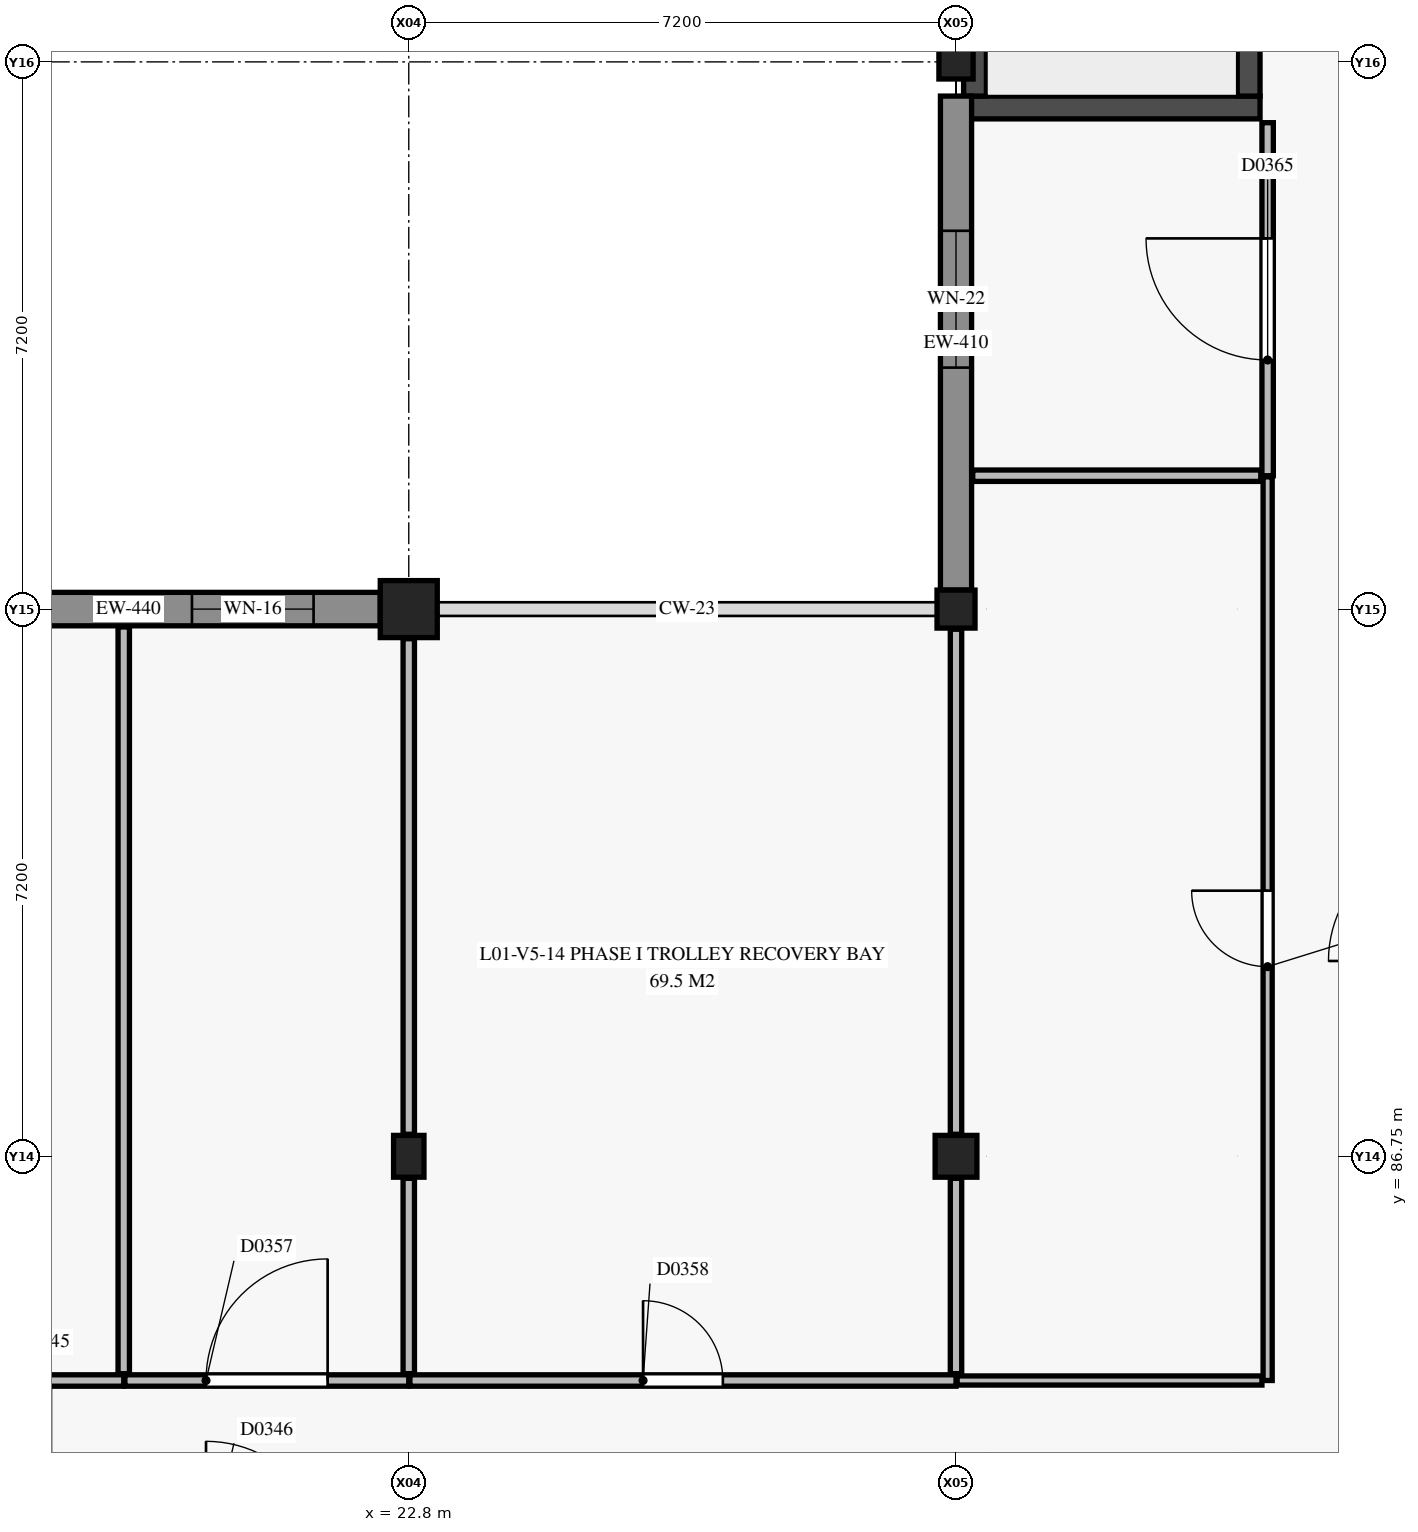
"""IFC4 building model, lengths in metres.
Left out: names, types, materials, properties, quantities, classifications, styles, units other than length and angle.
Written with IfcOpenShell. Run it as: python <this file> out.ifc"""

import sys

from ifc_helpers import new_model, si_unit, direction, frame, frame_2d, origin, origin_2d, place, context, subcontext, project, spatial, rectangle, extrude, element, fill, save


model = new_model("IFC4")
c1 = context("Model", 3, precision=1e-05, world=origin(), true_north=direction((0.0, 1.0)))
c2 = subcontext(c1, "Body", "Model", "MODEL_VIEW")
j1 = project(units=[si_unit("LENGTHUNIT", "METRE"), si_unit("PLANEANGLEUNIT", "RADIAN")], contexts=[c1])
p1 = place(None, origin())
s1 = spatial("IfcSite", under=j1, at=p1, CompositionType="ELEMENT")
p2 = place(p1, origin())
s2 = spatial("IfcBuilding", under=s1, at=p2, CompositionType="ELEMENT")
p3 = place(p2, frame((0.0, 0.0, 4.8)))
s3 = spatial("IfcBuildingStorey", under=s2, at=p3, CompositionType="ELEMENT", Elevation=4.8)
p4 = place(p3, frame((22.8, 86.75, 0.0), z_axis=(0.0, 0.0, 1.0), x_axis=(1.0, 0.0, 0.0)))
e1 = element("IfcColumn", 1, at=p4, inside=s3, PredefinedType="COLUMN", context=c2, shape_type="SweptSolid", body=[
    extrude(rectangle(XDim=0.4, YDim=0.55, at=origin_2d()), origin(), (0.0, 0.0, 1.0), 4.2),
])
p5 = place(p3, frame((22.8, 93.95, 0.0), z_axis=(0.0, 0.0, 1.0), x_axis=(1.0, 0.0, 0.0)))
e2 = element("IfcColumn", 2, at=p5, inside=s3, PredefinedType="COLUMN", context=c2, shape_type="SweptSolid", body=[
    extrude(rectangle(XDim=0.75, YDim=0.75, at=origin_2d()), origin(), (0.0, 0.0, 1.0), 4.2),
])
p6 = place(p3, frame((30.0, 86.75, 0.0), z_axis=(0.0, 0.0, 1.0), x_axis=(1.0, 0.0, 0.0)))
e3 = element("IfcColumn", 3, at=p6, inside=s3, PredefinedType="COLUMN", context=c2, shape_type="SweptSolid", body=[
    extrude(rectangle(XDim=0.55, YDim=0.55, at=origin_2d()), origin(), (0.0, 0.0, 1.0), 4.2),
])
p7 = place(p3, frame((30.0, 93.95, 0.0), z_axis=(0.0, 0.0, 1.0), x_axis=(1.0, 0.0, 0.0)))
e4 = element("IfcColumn", 4, at=p7, inside=s3, PredefinedType="COLUMN", context=c2, shape_type="SweptSolid", body=[
    extrude(rectangle(XDim=0.5, YDim=0.5, at=origin_2d()), origin(), (0.0, 0.0, 1.0), 4.2),
])
p8 = place(p3, frame((30.0, 101.15, 0.0), z_axis=(0.0, 0.0, 1.0), x_axis=(1.0, 0.0, 0.0)))
e5 = element("IfcColumn", 5, at=p8, inside=s3, PredefinedType="COLUMN", context=c2, shape_type="SweptSolid", body=[
    extrude(rectangle(XDim=0.45, YDim=0.45, at=origin_2d()), origin(), (0.0, 0.0, 1.0), 4.2),
])
p9 = place(p3, frame((30.1, 100.55, 0.0), z_axis=(0.0, 0.0, 1.0), x_axis=(1.0, 0.0, 0.0)))
e6 = element("IfcWall", 6, at=p9, inside=s3, PredefinedType="SHEAR", context=c2, shape_type="SweptSolid", body=[
    extrude(rectangle(XDim=3.9, YDim=0.3, at=frame_2d((1.95, 0.0))), origin(), (0.0, 0.0, 1.0), 3.95),
])
p10 = place(p3, frame((30.25, 100.7, 0.0), z_axis=(0.0, 0.0, 1.0), x_axis=(0.0, 1.0, 0.0)))
e7 = element("IfcWall", 7, at=p10, inside=s3, PredefinedType="SHEAR", context=c2, shape_type="SweptSolid", body=[
    extrude(rectangle(XDim=7.3, YDim=0.3, at=frame_2d((3.65, 0.0))), origin(), (0.0, 0.0, 1.0), 3.95),
])
p11 = place(p3, frame((33.85, 100.7, 0.0), z_axis=(0.0, 0.0, 1.0), x_axis=(0.0, 1.0, 0.0)))
e8 = element("IfcWall", 8, at=p11, inside=s3, PredefinedType="SHEAR", context=c2, shape_type="SweptSolid", body=[
    extrude(rectangle(XDim=7.3, YDim=0.3, at=frame_2d((3.65, 0.0))), origin(), (0.0, 0.0, 1.0), 3.95),
])
p12 = place(p11, frame((5.68, 0.0, 0.0)))
e9 = element("IfcOpeningElement", 9, at=p12, cuts=e8, PredefinedType="OPENING", context=c2, shape_type="SweptSolid", body=[
    extrude(rectangle(XDim=1.5, YDim=2.15, at=frame_2d((0.75, 1.075))), frame((0.0, 0.16, 0.0), z_axis=(0.0, -1.0, 0.0), x_axis=(1.0, 0.0, 0.0)), (0.0, 0.0, 1.0), 0.32),
])
p13 = place(p3, frame((15.8, 93.95, 0.0), z_axis=(0.0, 0.0, 1.0), x_axis=(1.0, 0.0, 0.0)))
e10 = element("IfcWall", 10, at=p13, inside=s3, PredefinedType="USERDEFINED", context=c2, shape_type="SweptSolid", body=[
    extrude(rectangle(XDim=6.625, YDim=0.44, at=frame_2d((3.312, 0.0))), origin(), (0.0, 0.0, 1.0), 3.13),
])
p14 = place(p13, frame((1.015, 0.0, 0.6)))
e11 = element("IfcOpeningElement", 11, at=p14, cuts=e10, PredefinedType="OPENING", context=c2, shape_type="SweptSolid", body=[
    extrude(rectangle(XDim=1.2, YDim=2.2, at=frame_2d((0.6, 1.1))), frame((0.0, 0.23, 0.0), z_axis=(0.0, -1.0, 0.0), x_axis=(1.0, 0.0, 0.0)), (0.0, 0.0, 1.0), 0.46),
])
p15 = place(p13, frame((4.147, 0.0, 0.6)))
e12 = element("IfcOpeningElement", 12, at=p15, cuts=e10, PredefinedType="OPENING", context=c2, shape_type="SweptSolid", body=[
    extrude(rectangle(XDim=1.6, YDim=2.2, at=frame_2d((0.8, 1.1))), frame((0.0, 0.23, 0.0), z_axis=(0.0, -1.0, 0.0), x_axis=(1.0, 0.0, 0.0)), (0.0, 0.0, 1.0), 0.46),
])
p16 = place(p3, frame((30.0, 94.2, 0.0), z_axis=(0.0, 0.0, 1.0), x_axis=(0.0, 1.0, 0.0)))
e13 = element("IfcWall", 13, at=p16, inside=s3, PredefinedType="USERDEFINED", context=c2, shape_type="SweptSolid", body=[
    extrude(rectangle(XDim=6.5, YDim=0.41, at=frame_2d((3.25, 0.0))), origin(), (0.0, 0.0, 1.0), 3.13),
])
p17 = place(p16, frame((2.927, 0.0, 0.9)))
e14 = element("IfcOpeningElement", 14, at=p17, cuts=e13, PredefinedType="OPENING", context=c2, shape_type="SweptSolid", body=[
    extrude(rectangle(XDim=1.8, YDim=0.9, at=frame_2d((0.9, 0.45))), frame((0.0, 0.215, 0.0), z_axis=(0.0, -1.0, 0.0), x_axis=(1.0, 0.0, 0.0)), (0.0, 0.0, 1.0), 0.43),
])
p18 = place(p3, frame((18.0, 83.8, 0.0), z_axis=(0.0, 0.0, 1.0), x_axis=(1.0, 0.0, 0.0)))
e15 = element("IfcWall", 15, at=p18, inside=s3, PredefinedType="PARTITIONING", context=c2, shape_type="SweptSolid", body=[
    extrude(rectangle(XDim=1.05, YDim=0.15, at=frame_2d((0.525, 0.0))), origin(), (0.0, 0.0, 1.0), 3.95),
])
p19 = place(p3, frame((19.065, 83.8, 0.0), z_axis=(0.0, 0.0, 1.0), x_axis=(1.0, 0.0, 0.0)))
e16 = element("IfcWall", 16, at=p19, inside=s3, PredefinedType="PARTITIONING", context=c2, shape_type="SweptSolid", body=[
    extrude(rectangle(XDim=3.735, YDim=0.15, at=frame_2d((1.868, 0.0))), origin(), (0.0, 0.0, 1.0), 3.235),
])
p20 = place(p19, frame((1.067, 0.0, 0.0)))
e17 = element("IfcOpeningElement", 17, at=p20, cuts=e16, PredefinedType="OPENING", context=c2, shape_type="SweptSolid", body=[
    extrude(rectangle(XDim=1.6, YDim=2.25, at=frame_2d((0.8, 1.125))), frame((0.0, 0.085, 0.0), z_axis=(0.0, -1.0, 0.0), x_axis=(1.0, 0.0, 0.0)), (0.0, 0.0, 1.0), 0.17),
])
p21 = place(p3, frame((34.1, 95.705, 0.0), z_axis=(0.0, 0.0, 1.0), x_axis=(0.0, 1.0, 0.0)))
e18 = element("IfcWall", 18, at=p21, inside=s3, PredefinedType="PARTITIONING", context=c2, shape_type="SweptSolid", body=[
    extrude(rectangle(XDim=4.645, YDim=0.15, at=frame_2d((2.323, 0.0))), origin(), (0.0, 0.0, 1.0), 3.475),
])
p22 = place(p21, frame((1.522, 0.0, 0.0)))
e19 = element("IfcOpeningElement", 19, at=p22, cuts=e18, PredefinedType="OPENING", context=c2, shape_type="SweptSolid", body=[
    extrude(rectangle(XDim=1.6, YDim=2.25, at=frame_2d((0.8, 1.125))), frame((0.0, 0.085, 0.0), z_axis=(0.0, -1.0, 0.0), x_axis=(1.0, 0.0, 0.0)), (0.0, 0.0, 1.0), 0.17),
])
p23 = place(p3, frame((22.815, 83.8, 0.0), z_axis=(0.0, 0.0, 1.0), x_axis=(1.0, 0.0, 0.0)))
e20 = element("IfcWall", 20, at=p23, inside=s3, PredefinedType="PARTITIONING", context=c2, shape_type="SweptSolid", body=[
    extrude(rectangle(XDim=7.185, YDim=0.15, at=frame_2d((3.593, 0.0))), origin(), (0.0, 0.0, 1.0), 3.235),
])
p24 = place(p23, frame((3.067, 0.0, 0.0)))
e21 = element("IfcOpeningElement", 21, at=p24, cuts=e20, PredefinedType="OPENING", context=c2, shape_type="SweptSolid", body=[
    extrude(rectangle(XDim=1.05, YDim=2.15, at=frame_2d((0.525, 1.075))), frame((0.0, 0.085, 0.0), z_axis=(0.0, -1.0, 0.0), x_axis=(1.0, 0.0, 0.0)), (0.0, 0.0, 1.0), 0.17),
])
p25 = place(p3, frame((34.1, 83.8, 0.0), z_axis=(0.0, 0.0, 1.0), x_axis=(0.0, 1.0, 0.0)))
e22 = element("IfcWall", 22, at=p25, inside=s3, PredefinedType="PARTITIONING", context=c2, shape_type="SweptSolid", body=[
    extrude(rectangle(XDim=11.89, YDim=0.12, at=frame_2d((5.945, 0.0))), origin(), (0.0, 0.0, 1.0), 3.235),
])
p26 = place(p25, frame((5.445, 0.0, 0.0)))
e23 = element("IfcOpeningElement", 23, at=p26, cuts=e22, PredefinedType="OPENING", context=c2, shape_type="SweptSolid", body=[
    extrude(rectangle(XDim=1.0, YDim=2.15, at=frame_2d((0.5, 1.075))), frame((0.0, 0.07, 0.0), z_axis=(0.0, -1.0, 0.0), x_axis=(1.0, 0.0, 0.0)), (0.0, 0.0, 1.0), 0.14),
])
p27 = place(p3, frame((30.015, 83.8, 0.0), z_axis=(0.0, 0.0, 1.0), x_axis=(1.0, 0.0, 0.0)))
e24 = element("IfcWall", 24, at=p27, inside=s3, PredefinedType="PARTITIONING", context=c2, shape_type="SweptSolid", body=[
    extrude(rectangle(XDim=4.01, YDim=0.12, at=frame_2d((2.005, 0.0))), origin(), (0.0, 0.0, 1.0), 3.355),
])
p28 = place(p3, frame((19.05, 83.89, 0.0), z_axis=(0.0, 0.0, 1.0), x_axis=(0.0, 1.0, 0.0)))
e25 = element("IfcWall", 25, at=p28, inside=s3, PredefinedType="PARTITIONING", context=c2, shape_type="SweptSolid", body=[
    extrude(rectangle(XDim=9.825, YDim=0.15, at=frame_2d((4.913, 0.0))), origin(), (0.0, 0.0, 1.0), 3.48),
])
p29 = place(p3, frame((22.8, 83.89, 0.0), z_axis=(0.0, 0.0, 1.0), x_axis=(0.0, 1.0, 0.0)))
e26 = element("IfcWall", 26, at=p29, inside=s3, PredefinedType="PARTITIONING", context=c2, shape_type="SweptSolid", body=[
    extrude(rectangle(XDim=2.57, YDim=0.15, at=frame_2d((1.285, 0.0))), origin(), (0.0, 0.0, 1.0), 3.235),
])
p30 = place(p3, frame((22.8, 87.04, 0.0), z_axis=(0.0, 0.0, 1.0), x_axis=(0.0, 1.0, 0.0)))
e27 = element("IfcWall", 27, at=p30, inside=s3, PredefinedType="PARTITIONING", context=c2, shape_type="SweptSolid", body=[
    extrude(rectangle(XDim=6.52, YDim=0.15, at=frame_2d((3.26, 0.0))), origin(), (0.0, 0.0, 1.0), 3.355),
])
p31 = place(p3, frame((30.22, 95.705, 0.0), z_axis=(0.0, 0.0, 1.0), x_axis=(1.0, 0.0, 0.0)))
e28 = element("IfcWall", 28, at=p31, inside=s3, PredefinedType="PARTITIONING", context=c2, shape_type="SweptSolid", body=[
    extrude(rectangle(XDim=3.79, YDim=0.15, at=frame_2d((1.895, 0.0))), origin(), (0.0, 0.0, 1.0), 3.95),
])
p32 = place(p3, frame((30.0, 83.89, 0.0), z_axis=(0.0, 0.0, 1.0), x_axis=(0.0, 1.0, 0.0)))
e29 = element("IfcWall", 29, at=p32, inside=s3, PredefinedType="PARTITIONING", context=c2, shape_type="SweptSolid", body=[
    extrude(rectangle(XDim=2.57, YDim=0.15, at=frame_2d((1.285, 0.0))), origin(), (0.0, 0.0, 1.0), 3.355),
])
p33 = place(p3, frame((30.0, 87.04, 0.0), z_axis=(0.0, 0.0, 1.0), x_axis=(0.0, 1.0, 0.0)))
e30 = element("IfcWall", 30, at=p33, inside=s3, PredefinedType="PARTITIONING", context=c2, shape_type="SweptSolid", body=[
    extrude(rectangle(XDim=6.645, YDim=0.15, at=frame_2d((3.323, 0.0))), origin(), (0.0, 0.0, 1.0), 3.385),
])
p34 = place(p15, origin())
e31 = element("IfcWindow", 31, at=p34, inside=s3, PartitioningType="SINGLE_PANEL", PredefinedType="WINDOW", context=c2, shape_type="SweptSolid", body=[
    extrude(rectangle(XDim=1.6, YDim=2.2, at=frame_2d((0.8, 1.1))), frame((0.0, 0.03, 0.0), z_axis=(0.0, -1.0, 0.0), x_axis=(1.0, 0.0, 0.0)), (0.0, 0.0, 1.0), 0.06),
])
fill(e12, e31)
p35 = place(p17, origin())
e32 = element("IfcWindow", 32, at=p35, inside=s3, PartitioningType="SINGLE_PANEL", PredefinedType="WINDOW", context=c2, shape_type="SweptSolid", body=[
    extrude(rectangle(XDim=1.8, YDim=0.9, at=frame_2d((0.9, 0.45))), frame((0.0, 0.03, 0.0), z_axis=(0.0, -1.0, 0.0), x_axis=(1.0, 0.0, 0.0)), (0.0, 0.0, 1.0), 0.06),
])
fill(e14, e32)
p36 = place(p20, origin())
e33 = element("IfcDoor", 33, at=p36, inside=s3, OperationType="SINGLE_SWING_RIGHT", PredefinedType="DOOR", context=c2, shape_type="SweptSolid", body=[
    extrude(rectangle(XDim=1.6, YDim=2.25, at=frame_2d((0.8, 1.125))), frame((0.0, 0.025, 0.0), z_axis=(0.0, -1.0, 0.0), x_axis=(1.0, 0.0, 0.0)), (0.0, 0.0, 1.0), 0.05),
])
fill(e17, e33)
p37 = place(p24, origin())
e34 = element("IfcDoor", 34, at=p37, inside=s3, OperationType="SINGLE_SWING_LEFT", PredefinedType="DOOR", context=c2, shape_type="SweptSolid", body=[
    extrude(rectangle(XDim=1.05, YDim=2.15, at=frame_2d((0.525, 1.075))), frame((0.0, 0.025, 0.0), z_axis=(0.0, -1.0, 0.0), x_axis=(1.0, 0.0, 0.0)), (0.0, 0.0, 1.0), 0.05),
])
fill(e21, e34)
p38 = place(p26, origin())
e35 = element("IfcDoor", 35, at=p38, inside=s3, OperationType="SINGLE_SWING_RIGHT", PredefinedType="DOOR", context=c2, shape_type="SweptSolid", body=[
    extrude(rectangle(XDim=1.0, YDim=2.15, at=frame_2d((0.5, 1.075))), frame((0.0, 0.025, 0.0), z_axis=(0.0, -1.0, 0.0), x_axis=(1.0, 0.0, 0.0)), (0.0, 0.0, 1.0), 0.05),
])
fill(e23, e35)
p39 = place(p22, origin())
e36 = element("IfcDoor", 36, at=p39, inside=s3, OperationType="SINGLE_SWING_RIGHT", PredefinedType="DOOR", context=c2, shape_type="SweptSolid", body=[
    extrude(rectangle(XDim=1.6, YDim=2.25, at=frame_2d((0.8, 1.125))), frame((0.0, 0.025, 0.0), z_axis=(0.0, -1.0, 0.0), x_axis=(1.0, 0.0, 0.0)), (0.0, 0.0, 1.0), 0.05),
])
fill(e19, e36)
save(model, sys.argv[1])
